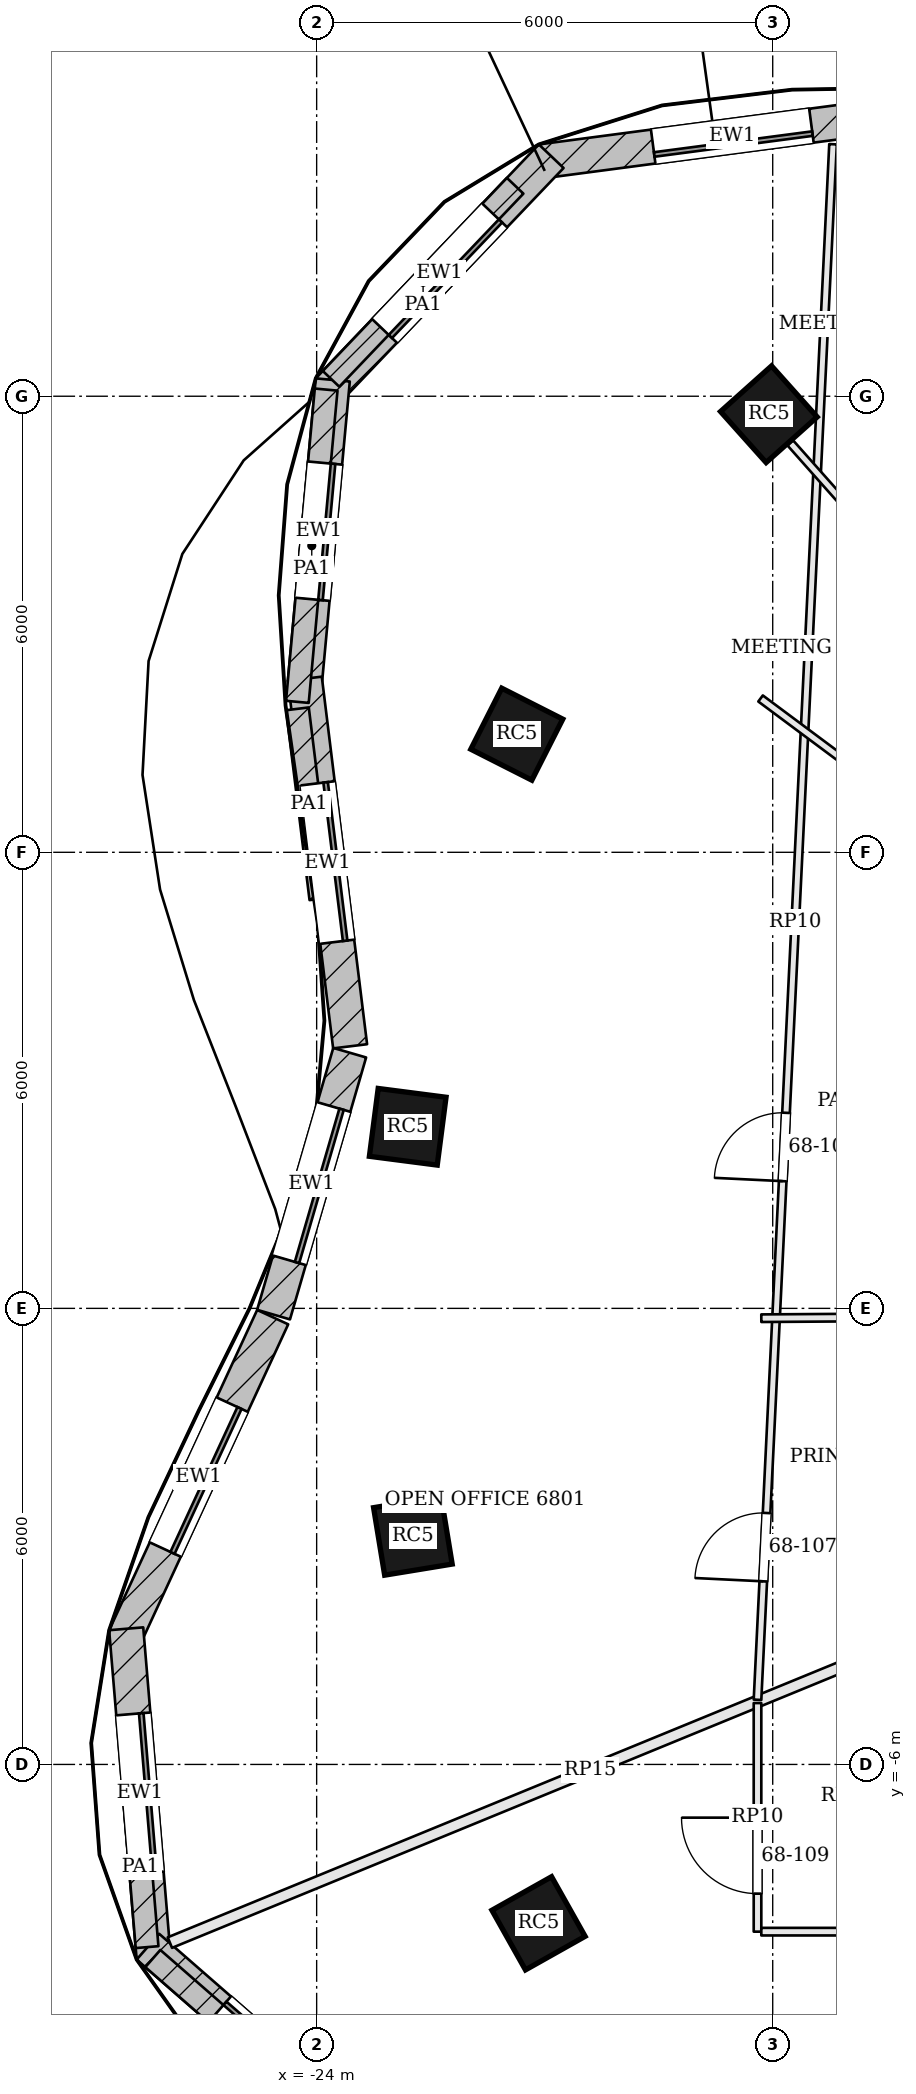
"""IFC4 building model, lengths in metres.
Left out: names, types, materials, properties, quantities, classifications, styles, units other than length and angle.
Written with IfcOpenShell. Run it as: python <this file> out.ifc"""

import sys

from ifc_helpers import new_model, si_unit, direction, frame, frame_2d, origin, origin_2d, place, context, subcontext, project, spatial, rectangle, extrude, element, fill, save


model = new_model("IFC4")
c1 = context("Model", 3, precision=1e-05, world=origin(), true_north=direction((0.0, 1.0)))
c2 = subcontext(c1, "Body", "Model", "MODEL_VIEW")
j1 = project(units=[si_unit("LENGTHUNIT", "METRE"), si_unit("PLANEANGLEUNIT", "RADIAN")], contexts=[c1])
p1 = place(None, origin())
s1 = spatial("IfcSite", under=j1, at=p1, CompositionType="ELEMENT")
p2 = place(p1, origin())
s2 = spatial("IfcBuilding", under=s1, at=p2, CompositionType="ELEMENT")
p3 = place(p2, frame((0.0, 0.0, 276.6)))
s3 = spatial("IfcBuildingStorey", under=s2, at=p3, CompositionType="ELEMENT", Elevation=276.6)
for number, where, z_axis, x_axis in (
    (1, (-18.051, 11.763, 0.0), (0.0, 0.0, 1.0), (-0.746, -0.666, 0.0)),
    (2, (-21.367, 7.554, 0.0), (0.0, 0.0, 1.0), (-0.452, -0.892, 0.0)),
    (3, (-22.802, 2.389, 0.0), (0.0, 0.0, 1.0), (-0.129, -0.992, 0.0)),
    (4, (-22.734, -2.993, 0.0), (0.0, 0.0, 1.0), (0.162, -0.987, 0.0)),
    (5, (-21.081, -8.09, 0.0), (0.0, 0.0, 1.0), (0.49, -0.872, 0.0)),
):
    element("IfcColumn", number, at=place(p3, frame(where, z_axis=z_axis, x_axis=x_axis)), inside=s3, PredefinedType="COLUMN", context=c2, shape_type="SweptSolid", body=[
        extrude(rectangle(XDim=0.9, YDim=0.9, at=origin_2d()), origin(), (0.0, 0.0, 1.0), 3.9),
    ])
p4 = place(p3, frame((-16.019, 15.753, 0.0), z_axis=(0.0, 0.0, 1.0), x_axis=(-0.991409967396, -0.130790965086, 0.0)))
e6 = element("IfcWall", 6, at=p4, inside=s3, PredefinedType="SOLIDWALL", context=c2, shape_type="SweptSolid", body=[
    extrude(rectangle(XDim=5.068, YDim=0.45, at=frame_2d((2.534, 0.0))), origin(), (0.0, 0.0, 1.0), 3.7),
])
p5 = place(p4, frame((1.484, 0.0, 0.9)))
e7 = element("IfcOpeningElement", 7, at=p5, cuts=e6, PredefinedType="OPENING", context=c2, shape_type="SweptSolid", body=[
    extrude(rectangle(XDim=2.1, YDim=2.3, at=frame_2d((1.05, 1.15))), frame((0.0, 0.235, 0.0), z_axis=(0.0, -1.0, 0.0), x_axis=(1.0, 0.0, 0.0)), (0.0, 0.0, 1.0), 0.47),
])
p6 = place(p3, frame((-20.914, 15.158, 0.0), z_axis=(0.0, 0.0, 1.0), x_axis=(-0.690057851873, -0.723754213161, 0.0)))
e8 = element("IfcWall", 8, at=p6, inside=s3, PredefinedType="SOLIDWALL", context=c2, shape_type="SweptSolid", body=[
    extrude(rectangle(XDim=4.253, YDim=0.45, at=frame_2d((2.126, 0.0))), origin(), (0.0, 0.0, 1.0), 3.7),
])
p7 = place(p6, frame((1.076, 0.0, 0.9)))
e9 = element("IfcOpeningElement", 9, at=p7, cuts=e8, PredefinedType="OPENING", context=c2, shape_type="SweptSolid", body=[
    extrude(rectangle(XDim=2.1, YDim=2.3, at=frame_2d((1.05, 1.15))), frame((0.0, 0.235, 0.0), z_axis=(0.0, -1.0, 0.0), x_axis=(1.0, 0.0, 0.0)), (0.0, 0.0, 1.0), 0.47),
])
p8 = place(p3, frame((-23.788, 12.214, 0.0), z_axis=(0.0, 0.0, 1.0), x_axis=(-0.091885237351, -0.995769603451, 0.0)))
e10 = element("IfcWall", 10, at=p8, inside=s3, PredefinedType="SOLIDWALL", context=c2, shape_type="SweptSolid", body=[
    extrude(rectangle(XDim=3.996, YDim=0.45, at=frame_2d((1.998, 0.0))), origin(), (0.0, 0.0, 1.0), 3.7),
])
p9 = place(p8, frame((1.098, 0.0, 0.9)))
e11 = element("IfcOpeningElement", 11, at=p9, cuts=e10, PredefinedType="OPENING", context=c2, shape_type="SweptSolid", body=[
    extrude(rectangle(XDim=1.8, YDim=2.3, at=frame_2d((0.9, 1.15))), frame((0.0, 0.235, 0.0), z_axis=(0.0, -1.0, 0.0), x_axis=(1.0, 0.0, 0.0)), (0.0, 0.0, 1.0), 0.47),
])
p10 = place(p3, frame((-24.156, 8.283, 0.0), z_axis=(0.0, 0.0, 1.0), x_axis=(0.122319995681, -0.992490714645, 0.0)))
e12 = element("IfcWall", 12, at=p10, inside=s3, PredefinedType="SOLIDWALL", context=c2, shape_type="SweptSolid", body=[
    extrude(rectangle(XDim=4.872, YDim=0.45, at=frame_2d((2.436, 0.0))), origin(), (0.0, 0.0, 1.0), 3.7),
])
p11 = place(p10, frame((1.386, 0.0, 0.9)))
e13 = element("IfcOpeningElement", 13, at=p11, cuts=e12, PredefinedType="OPENING", context=c2, shape_type="SweptSolid", body=[
    extrude(rectangle(XDim=2.1, YDim=2.3, at=frame_2d((1.05, 1.15))), frame((0.0, 0.235, 0.0), z_axis=(0.0, -1.0, 0.0), x_axis=(1.0, 0.0, 0.0)), (0.0, 0.0, 1.0), 0.47),
])
p12 = place(p3, frame((-23.565, 3.364, 0.0), z_axis=(0.0, 0.0, 1.0), x_axis=(-0.279148198653, -0.960248032119, 0.0)))
e14 = element("IfcWall", 14, at=p12, inside=s3, PredefinedType="SOLIDWALL", context=c2, shape_type="SweptSolid", body=[
    extrude(rectangle(XDim=3.588, YDim=0.45, at=frame_2d((1.794, 0.0))), origin(), (0.0, 0.0, 1.0), 3.7),
])
p13 = place(p12, frame((0.744, 0.0, 0.9)))
e15 = element("IfcOpeningElement", 15, at=p13, cuts=e14, PredefinedType="OPENING", context=c2, shape_type="SweptSolid", body=[
    extrude(rectangle(XDim=2.1, YDim=2.3, at=frame_2d((1.05, 1.15))), frame((0.0, 0.235, 0.0), z_axis=(0.0, -1.0, 0.0), x_axis=(1.0, 0.0, 0.0)), (0.0, 0.0, 1.0), 0.47),
])
p14 = place(p3, frame((-24.579, -0.115, 0.0), z_axis=(0.0, 0.0, 1.0), x_axis=(-0.419535648317, -0.907738861012, 0.0)))
e16 = element("IfcWall", 16, at=p14, inside=s3, PredefinedType="SOLIDWALL", context=c2, shape_type="SweptSolid", body=[
    extrude(rectangle(XDim=4.636, YDim=0.45, at=frame_2d((2.318, 0.0))), origin(), (0.0, 0.0, 1.0), 3.7),
])
p15 = place(p14, frame((1.268, 0.0, 0.9)))
e17 = element("IfcOpeningElement", 17, at=p15, cuts=e16, PredefinedType="OPENING", context=c2, shape_type="SweptSolid", body=[
    extrude(rectangle(XDim=2.1, YDim=2.3, at=frame_2d((1.05, 1.15))), frame((0.0, 0.235, 0.0), z_axis=(0.0, -1.0, 0.0), x_axis=(1.0, 0.0, 0.0)), (0.0, 0.0, 1.0), 0.47),
])
p16 = place(p3, frame((-26.506, -4.215, 0.0), z_axis=(0.0, 0.0, 1.0), x_axis=(0.083268523648, -0.996527146128, 0.0)))
e18 = element("IfcWall", 18, at=p16, inside=s3, PredefinedType="SOLIDWALL", context=c2, shape_type="SweptSolid", body=[
    extrude(rectangle(XDim=4.348, YDim=0.45, at=frame_2d((2.174, 0.0))), origin(), (0.0, 0.0, 1.0), 3.7),
])
p17 = place(p16, frame((1.124, 0.0, 0.9)))
e19 = element("IfcOpeningElement", 19, at=p17, cuts=e18, PredefinedType="OPENING", context=c2, shape_type="SweptSolid", body=[
    extrude(rectangle(XDim=2.1, YDim=2.3, at=frame_2d((1.05, 1.15))), frame((0.0, 0.235, 0.0), z_axis=(0.0, -1.0, 0.0), x_axis=(1.0, 0.0, 0.0)), (0.0, 0.0, 1.0), 0.47),
])
p18 = place(p3, frame((-26.22, -8.397, 0.0), z_axis=(0.0, 0.0, 1.0), x_axis=(0.753386948361, -0.657577452502, 0.0)))
e20 = element("IfcWall", 20, at=p18, inside=s3, PredefinedType="SOLIDWALL", context=c2, shape_type="SweptSolid", body=[
    extrude(rectangle(XDim=4.607, YDim=0.45, at=frame_2d((2.304, 0.0))), origin(), (0.0, 0.0, 1.0), 3.7),
])
p19 = place(p18, frame((1.254, 0.0, 0.9)))
e21 = element("IfcOpeningElement", 21, at=p19, cuts=e20, PredefinedType="OPENING", context=c2, shape_type="SweptSolid", body=[
    extrude(rectangle(XDim=2.1, YDim=2.3, at=frame_2d((1.05, 1.15))), frame((0.0, 0.235, 0.0), z_axis=(0.0, -1.0, 0.0), x_axis=(1.0, 0.0, 0.0)), (0.0, 0.0, 1.0), 0.47),
])
p20 = place(p3, frame((-21.388, 14.769, 3.9), z_axis=(0.0, 0.0, 1.0), x_axis=(-0.690144808601, -0.723671294969, 0.0)))
e22 = element("IfcWall", 22, at=p20, inside=s3, PredefinedType="PARAPET", context=c2, shape_type="SweptSolid", body=[
    extrude(rectangle(XDim=3.51, YDim=0.3, at=frame_2d((1.755, 0.0))), origin(), (0.0, 0.0, 1.0), 1.1),
])
p21 = place(p3, frame((-23.875, 12.087, 3.9), z_axis=(0.0, 0.0, 1.0), x_axis=(-0.091842900475, -0.995773509204, 0.0)))
e23 = element("IfcWall", 23, at=p21, inside=s3, PredefinedType="PARAPET", context=c2, shape_type="SweptSolid", body=[
    extrude(rectangle(XDim=4.125, YDim=0.3, at=frame_2d((2.063, 0.0))), origin(), (0.0, 0.0, 1.0), 1.1),
])
p22 = place(p3, frame((-24.252, 7.887, 3.9), z_axis=(0.0, 0.0, 1.0), x_axis=(0.122315432018, -0.992491277085, 0.0)))
e24 = element("IfcWall", 24, at=p22, inside=s3, PredefinedType="PARAPET", context=c2, shape_type="SweptSolid", body=[
    extrude(rectangle(XDim=2.517, YDim=0.3, at=frame_2d((1.258, 0.0))), origin(), (0.0, 0.0, 1.0), 1.1),
])
p23 = place(p3, frame((-26.407, -6.296, 3.9), z_axis=(0.0, 0.0, 1.0), x_axis=(0.083236561351, -0.99652981634, 0.0)))
e25 = element("IfcWall", 25, at=p23, inside=s3, PredefinedType="PARAPET", context=c2, shape_type="SweptSolid", body=[
    extrude(rectangle(XDim=2.115, YDim=0.3, at=frame_2d((1.057, 0.0))), origin(), (0.0, 0.0, 1.0), 1.1),
])
p24 = place(p3, frame((-26.155, -8.554, 3.9), z_axis=(0.0, 0.0, 1.0), x_axis=(0.753400870431, -0.657561501636, 0.0)))
e26 = element("IfcWall", 26, at=p24, inside=s3, PredefinedType="PARAPET", context=c2, shape_type="SweptSolid", body=[
    extrude(rectangle(XDim=4.438, YDim=0.3, at=frame_2d((2.219, 0.0))), origin(), (0.0, 0.0, 1.0), 1.1),
])
p25 = place(p3, frame((-25.931, -8.344, 0.0), z_axis=(0.0, 0.0, 1.0), x_axis=(0.925120628031, 0.379673311665, 0.0)))
e27 = element("IfcWall", 27, at=p25, inside=s3, PredefinedType="PARTITIONING", context=c2, shape_type="SweptSolid", body=[
    extrude(rectangle(XDim=11.957, YDim=0.15, at=frame_2d((5.979, 0.0))), origin(), (0.0, 0.0, 1.0), 3.184),
])
p26 = place(p3, frame((-18.2, -5.149, 0.0), z_axis=(0.0, 0.0, 1.0), x_axis=(0.048497558373, 0.998823301106, 0.0)))
e28 = element("IfcWall", 28, at=p26, inside=s3, PredefinedType="PARTITIONING", context=c2, shape_type="SweptSolid", body=[
    extrude(rectangle(XDim=20.489, YDim=0.1, at=frame_2d((10.244, 0.0))), origin(), (0.0, 0.0, 1.0), 3.184),
])
p27 = place(p26, frame((6.831, 0.0, 0.0)))
e29 = element("IfcOpeningElement", 29, at=p27, cuts=e28, PredefinedType="OPENING", context=c2, shape_type="SweptSolid", body=[
    extrude(rectangle(XDim=0.9, YDim=2.1, at=frame_2d((0.45, 1.05))), frame((0.0, 0.06, 0.0), z_axis=(0.0, -1.0, 0.0), x_axis=(1.0, 0.0, 0.0)), (0.0, 0.0, 1.0), 0.12),
])
p28 = place(p26, frame((1.56, 0.0, 0.0)))
e30 = element("IfcOpeningElement", 30, at=p28, cuts=e28, PredefinedType="OPENING", context=c2, shape_type="SweptSolid", body=[
    extrude(rectangle(XDim=0.9, YDim=2.1, at=frame_2d((0.45, 1.05))), frame((0.0, 0.06, 0.0), z_axis=(0.0, -1.0, 0.0), x_axis=(1.0, 0.0, 0.0)), (0.0, 0.0, 1.0), 0.12),
])
p29 = place(p3, frame((-14.85, 8.099, 0.0), z_axis=(0.0, 0.0, 1.0), x_axis=(-0.663984515268, 0.747746322949, 0.0)))
e31 = element("IfcWall", 31, at=p29, inside=s3, PredefinedType="PARTITIONING", context=c2, shape_type="SweptSolid", body=[
    extrude(rectangle(XDim=4.395, YDim=0.1, at=frame_2d((2.198, 0.0))), origin(), (0.0, 0.0, 1.0), 3.184),
])
p30 = place(p3, frame((-14.86, 5.568, 0.0), z_axis=(0.0, 0.0, 1.0), x_axis=(-0.80221669382, 0.597032977444, 0.0)))
e32 = element("IfcWall", 32, at=p30, inside=s3, PredefinedType="PARTITIONING", context=c2, shape_type="SweptSolid", body=[
    extrude(rectangle(XDim=4.113, YDim=0.1, at=frame_2d((2.057, 0.0))), origin(), (0.0, 0.0, 1.0), 3.184),
])
p31 = place(p3, frame((-14.875, -0.107, 0.0), z_axis=(0.0, 0.0, 1.0), x_axis=(-0.999977492681, -0.00670925707, 0.0)))
e33 = element("IfcWall", 33, at=p31, inside=s3, PredefinedType="PARTITIONING", context=c2, shape_type="SweptSolid", body=[
    extrude(rectangle(XDim=3.275, YDim=0.1, at=frame_2d((1.637, 0.0))), origin(), (0.0, 0.0, 1.0), 3.184),
])
p32 = place(p3, frame((-18.2, -8.2, 0.0), z_axis=(0.0, 0.0, 1.0), x_axis=(0.0, 1.0, 0.0)))
e34 = element("IfcWall", 34, at=p32, inside=s3, PredefinedType="PARTITIONING", context=c2, shape_type="SweptSolid", body=[
    extrude(rectangle(XDim=3.008, YDim=0.1, at=frame_2d((1.504, 0.0))), origin(), (0.0, 0.0, 1.0), 3.184),
])
p33 = place(p32, frame((0.5, 0.0, 0.0)))
e35 = element("IfcOpeningElement", 35, at=p33, cuts=e34, PredefinedType="OPENING", context=c2, shape_type="SweptSolid", body=[
    extrude(rectangle(XDim=1.0, YDim=2.1, at=frame_2d((0.5, 1.05))), frame((0.0, 0.06, 0.0), z_axis=(0.0, -1.0, 0.0), x_axis=(1.0, 0.0, 0.0)), (0.0, 0.0, 1.0), 0.12),
])
p34 = place(p3, frame((-4.494, -8.2, 0.0), z_axis=(0.0, 0.0, 1.0), x_axis=(-1.0, 0.0, 0.0)))
e36 = element("IfcWall", 36, at=p34, inside=s3, PredefinedType="PARTITIONING", context=c2, shape_type="SweptSolid", body=[
    extrude(rectangle(XDim=13.656, YDim=0.1, at=frame_2d((6.828, 0.0))), origin(), (0.0, 0.0, 1.0), 3.184),
])
p35 = place(p34, frame((1.131, 0.0, 0.0)))
e37 = element("IfcOpeningElement", 37, at=p35, cuts=e36, PredefinedType="OPENING", context=c2, shape_type="SweptSolid", body=[
    extrude(rectangle(XDim=0.9, YDim=2.1, at=frame_2d((0.45, 1.05))), frame((0.0, 0.06, 0.0), z_axis=(0.0, -1.0, 0.0), x_axis=(1.0, 0.0, 0.0)), (0.0, 0.0, 1.0), 0.12),
])
p36 = place(p5, origin())
e38 = element("IfcWindow", 38, at=p36, inside=s3, PartitioningType="SINGLE_PANEL", PredefinedType="WINDOW", context=c2, shape_type="SweptSolid", body=[
    extrude(rectangle(XDim=2.1, YDim=2.3, at=frame_2d((1.05, 1.15))), frame((0.0, 0.135, 0.0), z_axis=(0.0, -1.0, 0.0), x_axis=(1.0, 0.0, 0.0)), (0.0, 0.0, 1.0), 0.06),
])
fill(e7, e38)
p37 = place(p7, origin())
e39 = element("IfcWindow", 39, at=p37, inside=s3, PartitioningType="SINGLE_PANEL", PredefinedType="WINDOW", context=c2, shape_type="SweptSolid", body=[
    extrude(rectangle(XDim=2.1, YDim=2.3, at=frame_2d((1.05, 1.15))), frame((0.0, 0.135, 0.0), z_axis=(0.0, -1.0, 0.0), x_axis=(1.0, 0.0, 0.0)), (0.0, 0.0, 1.0), 0.06),
])
fill(e9, e39)
p38 = place(p9, origin())
e40 = element("IfcWindow", 40, at=p38, inside=s3, PartitioningType="SINGLE_PANEL", PredefinedType="WINDOW", context=c2, shape_type="SweptSolid", body=[
    extrude(rectangle(XDim=1.8, YDim=2.3, at=frame_2d((0.9, 1.15))), frame((0.0, 0.135, 0.0), z_axis=(0.0, -1.0, 0.0), x_axis=(1.0, 0.0, 0.0)), (0.0, 0.0, 1.0), 0.06),
])
fill(e11, e40)
p39 = place(p11, origin())
e41 = element("IfcWindow", 41, at=p39, inside=s3, PartitioningType="SINGLE_PANEL", PredefinedType="WINDOW", context=c2, shape_type="SweptSolid", body=[
    extrude(rectangle(XDim=2.1, YDim=2.3, at=frame_2d((1.05, 1.15))), frame((0.0, 0.135, 0.0), z_axis=(0.0, -1.0, 0.0), x_axis=(1.0, 0.0, 0.0)), (0.0, 0.0, 1.0), 0.06),
])
fill(e13, e41)
p40 = place(p13, origin())
e42 = element("IfcWindow", 42, at=p40, inside=s3, PartitioningType="SINGLE_PANEL", PredefinedType="WINDOW", context=c2, shape_type="SweptSolid", body=[
    extrude(rectangle(XDim=2.1, YDim=2.3, at=frame_2d((1.05, 1.15))), frame((0.0, 0.135, 0.0), z_axis=(0.0, -1.0, 0.0), x_axis=(1.0, 0.0, 0.0)), (0.0, 0.0, 1.0), 0.06),
])
fill(e15, e42)
p41 = place(p15, origin())
e43 = element("IfcWindow", 43, at=p41, inside=s3, PartitioningType="SINGLE_PANEL", PredefinedType="WINDOW", context=c2, shape_type="SweptSolid", body=[
    extrude(rectangle(XDim=2.1, YDim=2.3, at=frame_2d((1.05, 1.15))), frame((0.0, 0.135, 0.0), z_axis=(0.0, -1.0, 0.0), x_axis=(1.0, 0.0, 0.0)), (0.0, 0.0, 1.0), 0.06),
])
fill(e17, e43)
p42 = place(p17, origin())
e44 = element("IfcWindow", 44, at=p42, inside=s3, PartitioningType="SINGLE_PANEL", PredefinedType="WINDOW", context=c2, shape_type="SweptSolid", body=[
    extrude(rectangle(XDim=2.1, YDim=2.3, at=frame_2d((1.05, 1.15))), frame((0.0, 0.135, 0.0), z_axis=(0.0, -1.0, 0.0), x_axis=(1.0, 0.0, 0.0)), (0.0, 0.0, 1.0), 0.06),
])
fill(e19, e44)
p43 = place(p19, origin())
e45 = element("IfcWindow", 45, at=p43, inside=s3, PartitioningType="SINGLE_PANEL", PredefinedType="WINDOW", context=c2, shape_type="SweptSolid", body=[
    extrude(rectangle(XDim=2.1, YDim=2.3, at=frame_2d((1.05, 1.15))), frame((0.0, 0.135, 0.0), z_axis=(0.0, -1.0, 0.0), x_axis=(1.0, 0.0, 0.0)), (0.0, 0.0, 1.0), 0.06),
])
fill(e21, e45)
p44 = place(p27, origin())
e46 = element("IfcDoor", 46, at=p44, inside=s3, OperationType="SINGLE_SWING_LEFT", PredefinedType="DOOR", context=c2, shape_type="SweptSolid", body=[
    extrude(rectangle(XDim=0.9, YDim=2.1, at=frame_2d((0.45, 1.05))), frame((0.0, 0.025, 0.0), z_axis=(0.0, -1.0, 0.0), x_axis=(1.0, 0.0, 0.0)), (0.0, 0.0, 1.0), 0.05),
])
fill(e29, e46)
p45 = place(p28, origin())
e47 = element("IfcDoor", 47, at=p45, inside=s3, OperationType="SINGLE_SWING_LEFT", PredefinedType="DOOR", context=c2, shape_type="SweptSolid", body=[
    extrude(rectangle(XDim=0.9, YDim=2.1, at=frame_2d((0.45, 1.05))), frame((0.0, 0.025, 0.0), z_axis=(0.0, -1.0, 0.0), x_axis=(1.0, 0.0, 0.0)), (0.0, 0.0, 1.0), 0.05),
])
fill(e30, e47)
p46 = place(p33, origin())
e48 = element("IfcDoor", 48, at=p46, inside=s3, OperationType="SINGLE_SWING_RIGHT", PredefinedType="DOOR", context=c2, shape_type="SweptSolid", body=[
    extrude(rectangle(XDim=1.0, YDim=2.1, at=frame_2d((0.5, 1.05))), frame((0.0, 0.025, 0.0), z_axis=(0.0, -1.0, 0.0), x_axis=(1.0, 0.0, 0.0)), (0.0, 0.0, 1.0), 0.05),
])
fill(e35, e48)
save(model, sys.argv[1])
